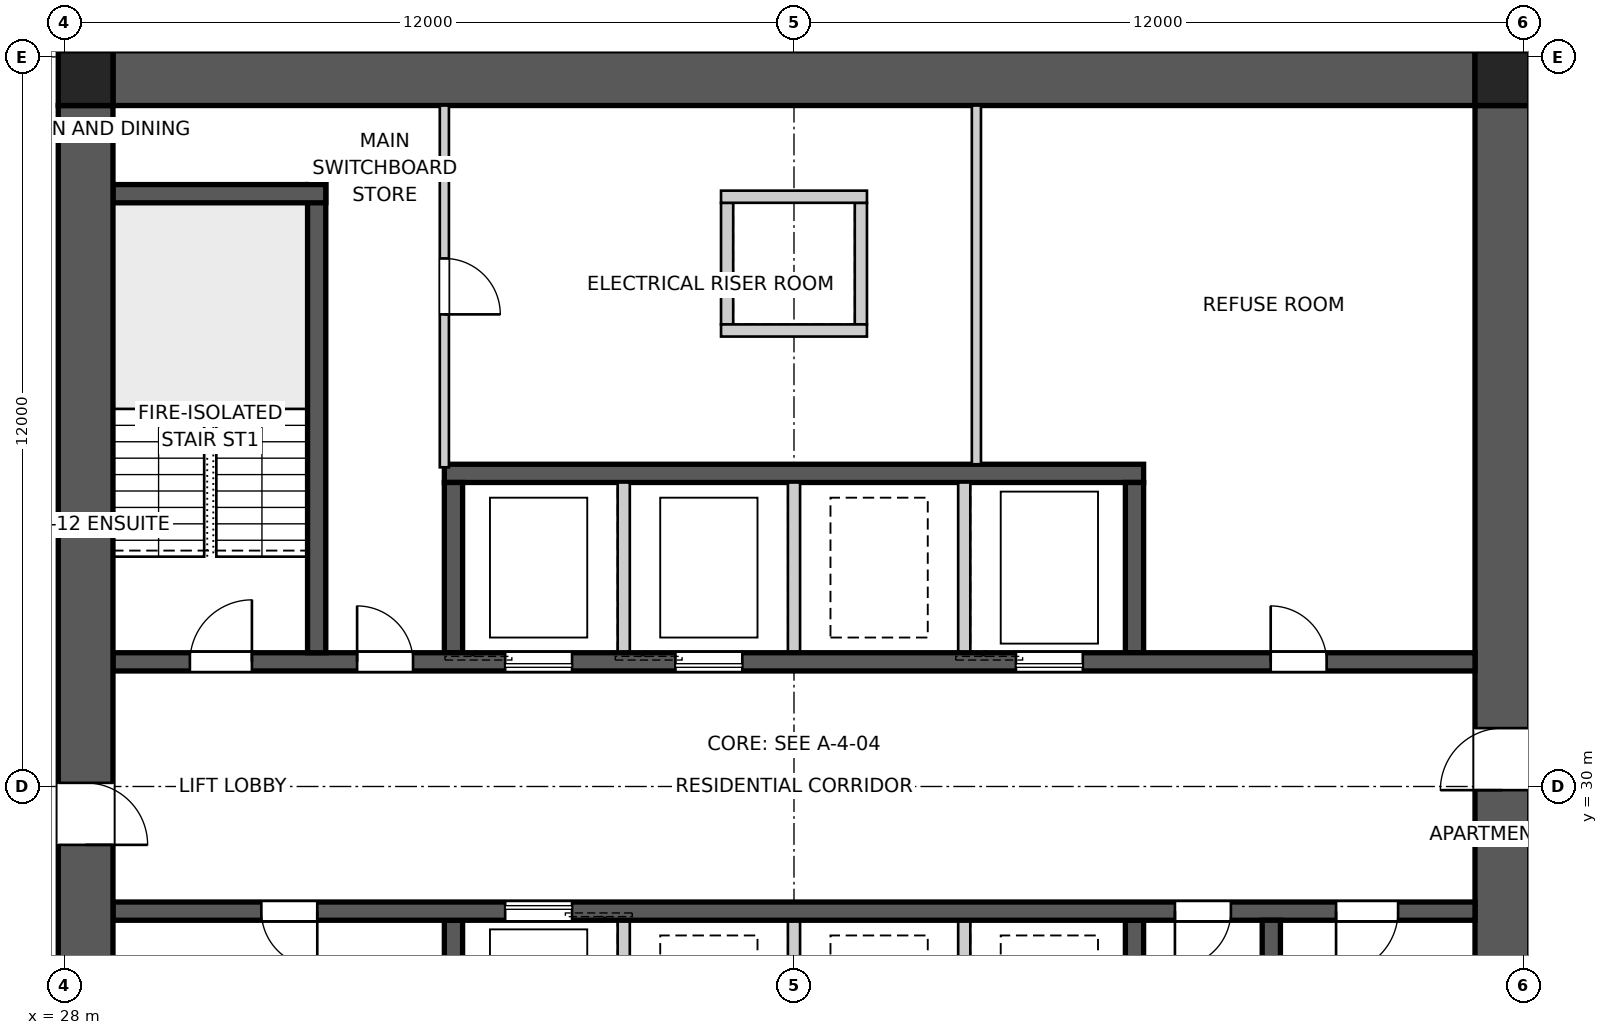
"""IFC4 building model, lengths in metres.
Left out: names, types, materials, properties, quantities, classifications, styles, units other than length and angle.
Written with IfcOpenShell. Run it as: python <this file> out.ifc"""

import sys

from ifc_helpers import new_model, si_unit, direction, frame, frame_2d, origin, origin_2d, place, context, subcontext, project, spatial, polyline, rectangle, outline, extrude, element, fill, save


model = new_model("IFC4")
c1 = context("Model", 3, precision=1e-05, world=origin(), true_north=direction((0.0, 1.0)))
c2 = subcontext(c1, "Body", "Model", "MODEL_VIEW")
j1 = project(units=[si_unit("LENGTHUNIT", "METRE"), si_unit("PLANEANGLEUNIT", "RADIAN")], contexts=[c1])
p1 = place(None, origin())
s1 = spatial("IfcSite", under=j1, at=p1, CompositionType="ELEMENT")
p2 = place(p1, origin())
s2 = spatial("IfcBuilding", under=s1, at=p2, CompositionType="ELEMENT")
p3 = place(p2, frame((0.0, 0.0, 15.0)))
s3 = spatial("IfcBuildingStorey", under=s2, at=p3, CompositionType="ELEMENT", Elevation=15.0)
p4 = place(p3, frame((28.8, 41.65, 0.0), z_axis=(0.0, 0.0, 1.0), x_axis=(1.0, 0.0, 0.0)))
e1 = element("IfcWall", 1, at=p4, inside=s3, PredefinedType="SHEAR", context=c2, shape_type="SweptSolid", body=[
    extrude(outline(polyline([(0.0, -0.45), (22.4, -0.45), (22.4, -0.025), (22.85, -0.025), (22.85, 0.025), (22.4, 0.025), (22.4, 0.45), (0.0, 0.45), (0.0, 0.025), (-0.45, 0.025), (-0.45, -0.025), (0.0, -0.025), (0.0, -0.45)])), origin(), (0.0, 0.0, 1.0), 3.4),
])
p5 = place(p3, frame((51.65, 18.8, 0.0), z_axis=(0.0, 0.0, 1.0), x_axis=(0.0, 1.0, 0.0)))
e2 = element("IfcWall", 2, at=p5, inside=s3, PredefinedType="SHEAR", context=c2, shape_type="SweptSolid", body=[
    extrude(outline(polyline([(0.0, -0.45), (22.4, -0.45), (22.4, -0.025), (22.85, -0.025), (22.85, 0.025), (22.4, 0.025), (22.4, 0.45), (0.0, 0.45), (0.0, 0.025), (-0.45, 0.025), (-0.45, -0.025), (0.0, -0.025), (0.0, -0.45)])), origin(), (0.0, 0.0, 1.0), 3.4),
])
p6 = place(p5, frame((11.14, 0.0, 0.0)))
e3 = element("IfcOpeningElement", 3, at=p6, cuts=e2, PredefinedType="OPENING", context=c2, shape_type="SweptSolid", body=[
    extrude(rectangle(XDim=1.02, YDim=2.4, at=frame_2d((0.51, 1.2))), frame((0.0, 0.46, 0.0), z_axis=(0.0, -1.0, 0.0), x_axis=(1.0, 0.0, 0.0)), (0.0, 0.0, 1.0), 0.92),
])
p7 = place(p3, frame((28.35, 41.2, 0.0), z_axis=(0.0, 0.0, 1.0), x_axis=(0.0, -1.0, 0.0)))
e4 = element("IfcWall", 4, at=p7, inside=s3, PredefinedType="SHEAR", context=c2, shape_type="SweptSolid", body=[
    extrude(outline(polyline([(0.0, -0.45), (22.4, -0.45), (22.4, -0.025), (22.85, -0.025), (22.85, 0.025), (22.4, 0.025), (22.4, 0.45), (0.0, 0.45), (0.0, 0.025), (-0.45, 0.025), (-0.45, -0.025), (0.0, -0.025), (0.0, -0.45)])), origin(), (0.0, 0.0, 1.0), 3.4),
])
p8 = place(p7, frame((11.14, 0.0, 0.0)))
e5 = element("IfcOpeningElement", 5, at=p8, cuts=e4, PredefinedType="OPENING", context=c2, shape_type="SweptSolid", body=[
    extrude(rectangle(XDim=1.02, YDim=2.4, at=frame_2d((0.51, 1.2))), frame((0.0, 0.46, 0.0), z_axis=(0.0, -1.0, 0.0), x_axis=(1.0, 0.0, 0.0)), (0.0, 0.0, 1.0), 0.92),
])
p9 = place(p3, frame((28.8, 32.05, 0.0), z_axis=(0.0, 0.0, 1.0), x_axis=(1.0, 0.0, 0.0)))
e6 = element("IfcWall", 6, at=p9, inside=s3, PredefinedType="SHEAR", context=c2, shape_type="SweptSolid", body=[
    extrude(rectangle(XDim=22.4, YDim=0.3, at=frame_2d((11.2, 0.0))), origin(), (0.0, 0.0, 1.0), 3.4),
])
p10 = place(p9, frame((19.04, 0.0, 0.0)))
e7 = element("IfcOpeningElement", 7, at=p10, cuts=e6, PredefinedType="OPENING", context=c2, shape_type="SweptSolid", body=[
    extrude(rectangle(XDim=0.92, YDim=2.1, at=frame_2d((0.46, 1.05))), frame((0.0, 0.16, 0.0), z_axis=(0.0, -1.0, 0.0), x_axis=(1.0, 0.0, 0.0)), (0.0, 0.0, 1.0), 0.32),
])
p11 = place(p9, frame((1.265, 0.0, 0.0)))
e8 = element("IfcOpeningElement", 8, at=p11, cuts=e6, PredefinedType="OPENING", context=c2, shape_type="SweptSolid", body=[
    extrude(rectangle(XDim=1.02, YDim=2.1, at=frame_2d((0.51, 1.05))), frame((0.0, 0.16, 0.0), z_axis=(0.0, -1.0, 0.0), x_axis=(1.0, 0.0, 0.0)), (0.0, 0.0, 1.0), 0.32),
])
p12 = place(p9, frame((4.015, 0.0, 0.0)))
e9 = element("IfcOpeningElement", 9, at=p12, cuts=e6, PredefinedType="OPENING", context=c2, shape_type="SweptSolid", body=[
    extrude(rectangle(XDim=0.92, YDim=2.1, at=frame_2d((0.46, 1.05))), frame((0.0, 0.16, 0.0), z_axis=(0.0, -1.0, 0.0), x_axis=(1.0, 0.0, 0.0)), (0.0, 0.0, 1.0), 0.32),
])
p13 = place(p9, frame((6.45, 0.0, 0.0)))
e10 = element("IfcOpeningElement", 10, at=p13, cuts=e6, PredefinedType="OPENING", context=c2, shape_type="SweptSolid", body=[
    extrude(rectangle(XDim=1.1, YDim=2.1, at=frame_2d((0.55, 1.05))), frame((0.0, 0.16, 0.0), z_axis=(0.0, -1.0, 0.0), x_axis=(1.0, 0.0, 0.0)), (0.0, 0.0, 1.0), 0.32),
])
p14 = place(p9, frame((9.25, 0.0, 0.0)))
e11 = element("IfcOpeningElement", 11, at=p14, cuts=e6, PredefinedType="OPENING", context=c2, shape_type="SweptSolid", body=[
    extrude(rectangle(XDim=1.1, YDim=2.1, at=frame_2d((0.55, 1.05))), frame((0.0, 0.16, 0.0), z_axis=(0.0, -1.0, 0.0), x_axis=(1.0, 0.0, 0.0)), (0.0, 0.0, 1.0), 0.32),
])
p15 = place(p9, frame((14.85, 0.0, 0.0)))
e12 = element("IfcOpeningElement", 12, at=p15, cuts=e6, PredefinedType="OPENING", context=c2, shape_type="SweptSolid", body=[
    extrude(rectangle(XDim=1.1, YDim=2.1, at=frame_2d((0.55, 1.05))), frame((0.0, 0.16, 0.0), z_axis=(0.0, -1.0, 0.0), x_axis=(1.0, 0.0, 0.0)), (0.0, 0.0, 1.0), 0.32),
])
p16 = place(p3, frame((51.2, 27.95, 0.0), z_axis=(0.0, 0.0, 1.0), x_axis=(-1.0, 0.0, 0.0)))
e13 = element("IfcWall", 13, at=p16, inside=s3, PredefinedType="SHEAR", context=c2, shape_type="SweptSolid", body=[
    extrude(rectangle(XDim=22.4, YDim=0.3, at=frame_2d((11.2, 0.0))), origin(), (0.0, 0.0, 1.0), 3.4),
])
p17 = place(p16, frame((19.04, 0.0, 0.0)))
e14 = element("IfcOpeningElement", 14, at=p17, cuts=e13, PredefinedType="OPENING", context=c2, shape_type="SweptSolid", body=[
    extrude(rectangle(XDim=0.92, YDim=2.1, at=frame_2d((0.46, 1.05))), frame((0.0, 0.16, 0.0), z_axis=(0.0, -1.0, 0.0), x_axis=(1.0, 0.0, 0.0)), (0.0, 0.0, 1.0), 0.32),
])
p18 = place(p16, frame((1.265, 0.0, 0.0)))
e15 = element("IfcOpeningElement", 15, at=p18, cuts=e13, PredefinedType="OPENING", context=c2, shape_type="SweptSolid", body=[
    extrude(rectangle(XDim=1.02, YDim=2.1, at=frame_2d((0.51, 1.05))), frame((0.0, 0.16, 0.0), z_axis=(0.0, -1.0, 0.0), x_axis=(1.0, 0.0, 0.0)), (0.0, 0.0, 1.0), 0.32),
])
p19 = place(p16, frame((4.015, 0.0, 0.0)))
e16 = element("IfcOpeningElement", 16, at=p19, cuts=e13, PredefinedType="OPENING", context=c2, shape_type="SweptSolid", body=[
    extrude(rectangle(XDim=0.92, YDim=2.1, at=frame_2d((0.46, 1.05))), frame((0.0, 0.16, 0.0), z_axis=(0.0, -1.0, 0.0), x_axis=(1.0, 0.0, 0.0)), (0.0, 0.0, 1.0), 0.32),
])
p20 = place(p16, frame((14.85, 0.0, 0.0)))
e17 = element("IfcOpeningElement", 17, at=p20, cuts=e13, PredefinedType="OPENING", context=c2, shape_type="SweptSolid", body=[
    extrude(rectangle(XDim=1.1, YDim=2.1, at=frame_2d((0.55, 1.05))), frame((0.0, 0.16, 0.0), z_axis=(0.0, -1.0, 0.0), x_axis=(1.0, 0.0, 0.0)), (0.0, 0.0, 1.0), 0.32),
])
p21 = place(p3, frame((34.25, 35.15, 0.0), z_axis=(0.0, 0.0, 1.0), x_axis=(1.0, 0.0, 0.0)))
e18 = element("IfcWall", 18, at=p21, inside=s3, PredefinedType="SHEAR", context=c2, shape_type="SweptSolid", body=[
    extrude(rectangle(XDim=11.5, YDim=0.3, at=frame_2d((5.75, 0.0))), origin(), (0.0, 0.0, 1.0), 3.4),
])
for number, where, z_axis, x_axis in (
    (19, (34.4, 32.2, 0.0), (0.0, 0.0, 1.0), (0.0, 1.0, 0.0)),
    (20, (45.6, 27.8, 0.0), (0.0, 0.0, 1.0), (0.0, -1.0, 0.0)),
):
    element("IfcWall", number, at=place(p3, frame(where, z_axis=z_axis, x_axis=x_axis)), inside=s3, PredefinedType="SHEAR", context=c2, shape_type="SweptSolid", body=[
        extrude(rectangle(XDim=2.8, YDim=0.3, at=frame_2d((1.4, 0.0))), origin(), (0.0, 0.0, 1.0), 3.4),
    ])
for number, where, z_axis, x_axis in (
    (21, (37.2, 32.2, 0.0), (0.0, 0.0, 1.0), (0.0, 1.0, 0.0)),
    (22, (42.8, 27.8, 0.0), (0.0, 0.0, 1.0), (0.0, -1.0, 0.0)),
    (23, (40.0, 32.2, 0.0), (0.0, 0.0, 1.0), (0.0, 1.0, 0.0)),
    (24, (40.0, 27.8, 0.0), (0.0, 0.0, 1.0), (0.0, -1.0, 0.0)),
    (25, (42.8, 32.2, 0.0), (0.0, 0.0, 1.0), (0.0, 1.0, 0.0)),
    (26, (37.2, 27.8, 0.0), (0.0, 0.0, 1.0), (0.0, -1.0, 0.0)),
):
    element("IfcWall", number, at=place(p3, frame(where, z_axis=z_axis, x_axis=x_axis)), inside=s3, PredefinedType="SOLIDWALL", context=c2, shape_type="SweptSolid", body=[
        extrude(rectangle(XDim=2.8, YDim=0.2, at=frame_2d((1.4, 0.0))), origin(), (0.0, 0.0, 1.0), 3.4),
    ])
for number, where, z_axis, x_axis in (
    (27, (45.6, 32.2, 0.0), (0.0, 0.0, 1.0), (0.0, 1.0, 0.0)),
    (28, (34.4, 27.8, 0.0), (0.0, 0.0, 1.0), (0.0, -1.0, 0.0)),
):
    element("IfcWall", number, at=place(p3, frame(where, z_axis=z_axis, x_axis=x_axis)), inside=s3, PredefinedType="SHEAR", context=c2, shape_type="SweptSolid", body=[
        extrude(rectangle(XDim=2.8, YDim=0.3, at=frame_2d((1.4, 0.0))), origin(), (0.0, 0.0, 1.0), 3.4),
    ])
p22 = place(p3, frame((32.15, 32.2, 0.0), z_axis=(0.0, 0.0, 1.0), x_axis=(0.0, 1.0, 0.0)))
e29 = element("IfcWall", 29, at=p22, inside=s3, PredefinedType="SHEAR", context=c2, shape_type="SweptSolid", body=[
    extrude(rectangle(XDim=7.7, YDim=0.3, at=frame_2d((3.85, 0.0))), origin(), (0.0, 0.0, 1.0), 3.4),
])
p23 = place(p3, frame((28.8, 39.75, 0.0), z_axis=(0.0, 0.0, 1.0), x_axis=(1.0, 0.0, 0.0)))
e30 = element("IfcWall", 30, at=p23, inside=s3, PredefinedType="SHEAR", context=c2, shape_type="SweptSolid", body=[
    extrude(rectangle(XDim=3.5, YDim=0.3, at=frame_2d((1.75, 0.0))), origin(), (0.0, 0.0, 1.0), 3.4),
])
p24 = place(p3, frame((47.85, 27.8, 0.0), z_axis=(0.0, 0.0, 1.0), x_axis=(0.0, -1.0, 0.0)))
e31 = element("IfcWall", 31, at=p24, inside=s3, PredefinedType="SHEAR", context=c2, shape_type="SweptSolid", body=[
    extrude(rectangle(XDim=7.7, YDim=0.3, at=frame_2d((3.85, 0.0))), origin(), (0.0, 0.0, 1.0), 3.4),
])
for number, where, z_axis, x_axis in (
    (32, (38.9, 37.6, 0.0), (0.0, 0.0, 1.0), (0.0, 1.0, 0.0)),
    (33, (41.1, 37.6, 0.0), (0.0, 0.0, 1.0), (0.0, 1.0, 0.0)),
):
    element("IfcWall", number, at=place(p3, frame(where, z_axis=z_axis, x_axis=x_axis)), inside=s3, PredefinedType="SOLIDWALL", context=c2, shape_type="SweptSolid", body=[
        extrude(rectangle(XDim=2.0, YDim=0.2, at=frame_2d((1.0, 0.0))), origin(), (0.0, 0.0, 1.0), 3.4),
    ])
for number, where, z_axis, x_axis in (
    (34, (38.8, 37.5, 0.0), (0.0, 0.0, 1.0), (1.0, 0.0, 0.0)),
    (35, (38.8, 39.7, 0.0), (0.0, 0.0, 1.0), (1.0, 0.0, 0.0)),
):
    element("IfcWall", number, at=place(p3, frame(where, z_axis=z_axis, x_axis=x_axis)), inside=s3, PredefinedType="SOLIDWALL", context=c2, shape_type="SweptSolid", body=[
        extrude(rectangle(XDim=2.4, YDim=0.2, at=frame_2d((1.2, 0.0))), origin(), (0.0, 0.0, 1.0), 3.4),
    ])
for number, where, z_axis, x_axis in (
    (36, (51.65, 41.65, 0.0), (0.0, 0.0, 1.0), (1.0, 0.0, 0.0)),
    (37, (28.35, 41.65, 0.0), (0.0, 0.0, 1.0), (1.0, 0.0, 0.0)),
):
    element("IfcColumn", number, at=place(p3, frame(where, z_axis=z_axis, x_axis=x_axis)), inside=s3, PredefinedType="COLUMN", context=c2, shape_type="SweptSolid", body=[
        extrude(rectangle(XDim=0.9, YDim=0.9, at=origin_2d()), origin(), (0.0, 0.0, 1.0), 3.4),
    ])
p25 = place(p3, frame((34.25, 41.2, 0.0), z_axis=(0.0, 0.0, 1.0), x_axis=(0.0, -1.0, 0.0)))
e38 = element("IfcWall", 38, at=p25, inside=s3, PredefinedType="SOLIDWALL", context=c2, shape_type="SweptSolid", body=[
    extrude(rectangle(XDim=5.95, YDim=0.15, at=frame_2d((2.975, 0.0))), origin(), (0.0, 0.0, 1.0), 3.25),
])
p26 = place(p25, frame((2.515, 0.0, 0.0)))
e39 = element("IfcOpeningElement", 39, at=p26, cuts=e38, PredefinedType="OPENING", context=c2, shape_type="SweptSolid", body=[
    extrude(rectangle(XDim=0.92, YDim=2.1, at=frame_2d((0.46, 1.05))), frame((0.0, 0.085, 0.0), z_axis=(0.0, -1.0, 0.0), x_axis=(1.0, 0.0, 0.0)), (0.0, 0.0, 1.0), 0.17),
])
p27 = place(p3, frame((43.0, 41.2, 0.0), z_axis=(0.0, 0.0, 1.0), x_axis=(0.0, -1.0, 0.0)))
e40 = element("IfcWall", 40, at=p27, inside=s3, PredefinedType="SOLIDWALL", context=c2, shape_type="SweptSolid", body=[
    extrude(rectangle(XDim=5.9, YDim=0.15, at=frame_2d((2.95, 0.0))), origin(), (0.0, 0.0, 1.0), 3.25),
])
p28 = place(p10, origin())
e41 = element("IfcDoor", 41, at=p28, inside=s3, OperationType="SINGLE_SWING_LEFT", PredefinedType="DOOR", context=c2, shape_type="SweptSolid", body=[
    extrude(rectangle(XDim=0.92, YDim=2.1, at=frame_2d((0.46, 1.05))), frame((0.0, 0.025, 0.0), z_axis=(0.0, -1.0, 0.0), x_axis=(1.0, 0.0, 0.0)), (0.0, 0.0, 1.0), 0.05),
])
fill(e7, e41)
p29 = place(p17, origin())
e42 = element("IfcDoor", 42, at=p29, inside=s3, OperationType="SINGLE_SWING_LEFT", PredefinedType="DOOR", context=c2, shape_type="SweptSolid", body=[
    extrude(rectangle(XDim=0.92, YDim=2.1, at=frame_2d((0.46, 1.05))), frame((0.0, 0.025, 0.0), z_axis=(0.0, -1.0, 0.0), x_axis=(1.0, 0.0, 0.0)), (0.0, 0.0, 1.0), 0.05),
])
fill(e14, e42)
p30 = place(p18, origin())
e43 = element("IfcDoor", 43, at=p30, inside=s3, OperationType="SINGLE_SWING_RIGHT", PredefinedType="DOOR", context=c2, shape_type="SweptSolid", body=[
    extrude(rectangle(XDim=1.02, YDim=2.1, at=frame_2d((0.51, 1.05))), frame((0.0, 0.025, 0.0), z_axis=(0.0, -1.0, 0.0), x_axis=(1.0, 0.0, 0.0)), (0.0, 0.0, 1.0), 0.05),
])
fill(e15, e43)
p31 = place(p11, origin())
e44 = element("IfcDoor", 44, at=p31, inside=s3, OperationType="SINGLE_SWING_RIGHT", PredefinedType="DOOR", context=c2, shape_type="SweptSolid", body=[
    extrude(rectangle(XDim=1.02, YDim=2.1, at=frame_2d((0.51, 1.05))), frame((0.0, 0.025, 0.0), z_axis=(0.0, -1.0, 0.0), x_axis=(1.0, 0.0, 0.0)), (0.0, 0.0, 1.0), 0.05),
])
fill(e8, e44)
p32 = place(p12, origin())
e45 = element("IfcDoor", 45, at=p32, inside=s3, OperationType="SINGLE_SWING_LEFT", PredefinedType="DOOR", context=c2, shape_type="SweptSolid", body=[
    extrude(rectangle(XDim=0.92, YDim=2.1, at=frame_2d((0.46, 1.05))), frame((0.0, 0.025, 0.0), z_axis=(0.0, -1.0, 0.0), x_axis=(1.0, 0.0, 0.0)), (0.0, 0.0, 1.0), 0.05),
])
fill(e9, e45)
p33 = place(p19, origin())
e46 = element("IfcDoor", 46, at=p33, inside=s3, OperationType="SINGLE_SWING_RIGHT", PredefinedType="DOOR", context=c2, shape_type="SweptSolid", body=[
    extrude(rectangle(XDim=0.92, YDim=2.1, at=frame_2d((0.46, 1.05))), frame((0.0, 0.025, 0.0), z_axis=(0.0, -1.0, 0.0), x_axis=(1.0, 0.0, 0.0)), (0.0, 0.0, 1.0), 0.05),
])
fill(e16, e46)
p34 = place(p26, origin())
e47 = element("IfcDoor", 47, at=p34, inside=s3, OperationType="SINGLE_SWING_RIGHT", PredefinedType="DOOR", context=c2, shape_type="SweptSolid", body=[
    extrude(rectangle(XDim=0.92, YDim=2.1, at=frame_2d((0.46, 1.05))), frame((0.0, 0.025, 0.0), z_axis=(0.0, -1.0, 0.0), x_axis=(1.0, 0.0, 0.0)), (0.0, 0.0, 1.0), 0.05),
])
fill(e39, e47)
p35 = place(p6, origin())
e48 = element("IfcDoor", 48, at=p35, inside=s3, OperationType="SINGLE_SWING_LEFT", PredefinedType="DOOR", context=c2, shape_type="SweptSolid", body=[
    extrude(rectangle(XDim=1.02, YDim=2.4, at=frame_2d((0.51, 1.2))), frame((0.0, 0.025, 0.0), z_axis=(0.0, -1.0, 0.0), x_axis=(1.0, 0.0, 0.0)), (0.0, 0.0, 1.0), 0.05),
])
fill(e3, e48)
p36 = place(p8, origin())
e49 = element("IfcDoor", 49, at=p36, inside=s3, OperationType="SINGLE_SWING_RIGHT", PredefinedType="DOOR", context=c2, shape_type="SweptSolid", body=[
    extrude(rectangle(XDim=1.02, YDim=2.4, at=frame_2d((0.51, 1.2))), frame((0.0, 0.025, 0.0), z_axis=(0.0, -1.0, 0.0), x_axis=(1.0, 0.0, 0.0)), (0.0, 0.0, 1.0), 0.05),
])
fill(e5, e49)
p37 = place(p13, origin())
e50 = element("IfcDoor", 50, at=p37, inside=s3, OperationType="SLIDING_TO_LEFT", PredefinedType="DOOR", context=c2, shape_type="SweptSolid", body=[
    extrude(rectangle(XDim=1.1, YDim=2.1, at=frame_2d((0.55, 1.05))), frame((0.0, 0.025, 0.0), z_axis=(0.0, -1.0, 0.0), x_axis=(1.0, 0.0, 0.0)), (0.0, 0.0, 1.0), 0.05),
])
fill(e10, e50)
p38 = place(p14, origin())
e51 = element("IfcDoor", 51, at=p38, inside=s3, OperationType="SLIDING_TO_LEFT", PredefinedType="DOOR", context=c2, shape_type="SweptSolid", body=[
    extrude(rectangle(XDim=1.1, YDim=2.1, at=frame_2d((0.55, 1.05))), frame((0.0, 0.025, 0.0), z_axis=(0.0, -1.0, 0.0), x_axis=(1.0, 0.0, 0.0)), (0.0, 0.0, 1.0), 0.05),
])
fill(e11, e51)
p39 = place(p15, origin())
e52 = element("IfcDoor", 52, at=p39, inside=s3, OperationType="SLIDING_TO_LEFT", PredefinedType="DOOR", context=c2, shape_type="SweptSolid", body=[
    extrude(rectangle(XDim=1.1, YDim=2.1, at=frame_2d((0.55, 1.05))), frame((0.0, 0.025, 0.0), z_axis=(0.0, -1.0, 0.0), x_axis=(1.0, 0.0, 0.0)), (0.0, 0.0, 1.0), 0.05),
])
fill(e12, e52)
p40 = place(p20, origin())
e53 = element("IfcDoor", 53, at=p40, inside=s3, OperationType="SLIDING_TO_LEFT", PredefinedType="DOOR", context=c2, shape_type="SweptSolid", body=[
    extrude(rectangle(XDim=1.1, YDim=2.1, at=frame_2d((0.55, 1.05))), frame((0.0, 0.025, 0.0), z_axis=(0.0, -1.0, 0.0), x_axis=(1.0, 0.0, 0.0)), (0.0, 0.0, 1.0), 0.05),
])
fill(e17, e53)
save(model, sys.argv[1])
